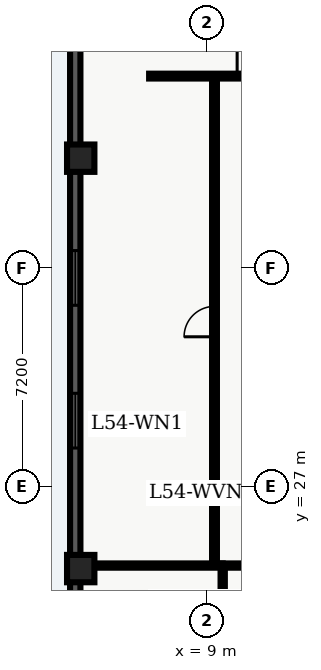
"""IFC4 building model, lengths in metres.
Left out: names, types, materials, properties, quantities, classifications, styles, units other than length and angle.
Written with IfcOpenShell. Run it as: python <this file> out.ifc"""

import sys

from ifc_helpers import new_model, entity, si_unit, converted_unit, direction, frame, origin_with_axes, origin_2d_with_axis, place, context, subcontext, project, spatial, polyline, rectangle, outline, extrude, element, fill, save


model = new_model("IFC4")
c1 = context("Model", 3, precision=1e-05, world=origin_with_axes(), true_north=direction((0.0, 1.0)))
c2 = subcontext(c1, "Body", "Model", "MODEL_VIEW")
j1 = project(units=[si_unit("LENGTHUNIT", "METRE"), converted_unit("PLANEANGLEUNIT", "DEGREE", entity("IfcPlaneAngleMeasure", 0.017), si_unit("PLANEANGLEUNIT", "RADIAN"), dimensions=[0, 0, 0, 0, 0, 0, 0])], contexts=[c1])
p1 = place(None, origin_with_axes())
s1 = spatial("IfcSite", under=j1, at=p1, CompositionType="ELEMENT")
p2 = place(p1, origin_with_axes())
s2 = spatial("IfcBuilding", under=s1, at=p2, CompositionType="ELEMENT")
p3 = place(p2, frame((0.0, 0.0, 219.9), z_axis=(0.0, 0.0, 1.0), x_axis=(1.0, 0.0, 0.0)))
s3 = spatial("IfcBuildingStorey", under=s2, at=p3, CompositionType="ELEMENT", Elevation=219.9)
for number, where, z_axis, x_axis in (
    (1, (4.85, 24.3, 0.0), (0.0, 0.0, 1.0), (1.0, 0.0, 0.0)),
    (2, (4.85, 37.8, 0.0), (0.0, 0.0, 1.0), (1.0, 0.0, 0.0)),
):
    element("IfcColumn", number, at=place(p3, frame(where, z_axis=z_axis, x_axis=x_axis)), inside=s3, PredefinedType="COLUMN", context=c2, shape_type="SweptSolid", body=[
        extrude(rectangle(XDim=0.9, YDim=0.9, at=origin_2d_with_axis()), origin_with_axes(), (0.0, 0.0, 1.0), 4.8),
    ])
p4 = place(p3, frame((9.52, 20.4, 0.0), z_axis=(0.0, 0.0, 1.0), x_axis=(0.0, 1.0, 0.0)))
e3 = element("IfcWall", 3, at=p4, inside=s3, PredefinedType="PARTITIONING", context=c2, shape_type="SweptSolid", body=[
    extrude(outline(polyline([(0.0, -0.07), (4.0, -0.07), (4.0, 0.07), (0.0, 0.07), (0.0, -0.07)])), origin_with_axes(), (0.0, 0.0, 1.0), 3.2),
])
p5 = place(p3, frame((9.52, 24.4, 0.0), z_axis=(0.0, 0.0, 1.0), x_axis=(1.0, 0.0, 0.0)))
e4 = element("IfcWall", 4, at=p5, inside=s3, PredefinedType="PARTITIONING", context=c2, shape_type="SweptSolid", body=[
    extrude(outline(polyline([(0.0, -0.07), (1.58, -0.07), (1.58, 0.07), (0.0, 0.07), (0.0, -0.07)])), origin_with_axes(), (0.0, 0.0, 1.0), 3.2),
])
p6 = place(p3, frame((7.1, 40.5, 0.0), z_axis=(0.0, 0.0, 1.0), x_axis=(1.0, 0.0, 0.0)))
e5 = element("IfcWall", 5, at=p6, inside=s3, PredefinedType="PARTITIONING", context=c2, shape_type="SweptSolid", body=[
    extrude(outline(polyline([(0.0, -0.08), (24.965, -0.08), (24.965, 0.08), (0.0, 0.08), (0.0, -0.08)])), origin_with_axes(), (0.0, 0.0, 1.0), 3.2),
])
p7 = place(p6, frame((3.395, 0.0, 0.0), z_axis=(0.0, 0.0, 1.0), x_axis=(1.0, 0.0, 0.0)))
e6 = element("IfcOpeningElement", 6, at=p7, cuts=e5, PredefinedType="OPENING", context=c2, shape_type="SweptSolid", body=[
    extrude(rectangle(XDim=1.0, YDim=0.18, at=origin_2d_with_axis()), origin_with_axes(), (0.0, 0.0, 1.0), 2.15),
])
p8 = place(p6, frame((8.66, 0.0, 0.0), z_axis=(0.0, 0.0, 1.0), x_axis=(1.0, 0.0, 0.0)))
e7 = element("IfcOpeningElement", 7, at=p8, cuts=e5, PredefinedType="OPENING", context=c2, shape_type="SweptSolid", body=[
    extrude(rectangle(XDim=1.0, YDim=0.18, at=origin_2d_with_axis()), origin_with_axes(), (0.0, 0.0, 1.0), 2.15),
])
p9 = place(p3, frame((9.25, 24.4, 0.0), z_axis=(0.0, 0.0, 1.0), x_axis=(0.0, 1.0, 0.0)))
e8 = element("IfcWall", 8, at=p9, inside=s3, PredefinedType="PARTITIONING", context=c2, shape_type="SweptSolid", body=[
    extrude(outline(polyline([(0.0, -0.08), (16.1, -0.08), (16.1, 0.08), (0.0, 0.08), (0.0, -0.08)])), origin_with_axes(), (0.0, 0.0, 1.0), 3.2),
])
p10 = place(p9, frame((8.025, 0.0, 0.0), z_axis=(0.0, 0.0, 1.0), x_axis=(1.0, 0.0, 0.0)))
e9 = element("IfcOpeningElement", 9, at=p10, cuts=e8, PredefinedType="OPENING", context=c2, shape_type="SweptSolid", body=[
    extrude(rectangle(XDim=1.0, YDim=0.18, at=origin_2d_with_axis()), origin_with_axes(), (0.0, 0.0, 1.0), 2.15),
])
p11 = place(p3, frame((4.835, 24.4, 0.0), z_axis=(0.0, 0.0, 1.0), x_axis=(1.0, 0.0, 0.0)))
e10 = element("IfcWall", 10, at=p11, inside=s3, PredefinedType="PARTITIONING", context=c2, shape_type="SweptSolid", body=[
    extrude(outline(polyline([(0.0, -0.07), (4.685, -0.07), (4.685, 0.07), (0.0, 0.07), (0.0, -0.07)])), origin_with_axes(), (0.0, 0.0, 1.0), 3.2),
])
p12 = place(p3, frame((4.67, 2.74, 0.0), z_axis=(0.0, 0.0, 1.0), x_axis=(0.0, 1.0, 0.0)))
e11 = element("IfcWall", 11, at=p12, inside=s3, PredefinedType="SOLIDWALL", context=c2, shape_type="SweptSolid", body=[
    extrude(outline(polyline([(0.0, -0.17), (43.46, -0.17), (43.46, 0.17), (0.0, 0.17), (0.0, -0.17)])), origin_with_axes(), (0.0, 0.0, 1.0), 4.56),
])
p13 = place(p12, frame((2.948, 0.0, 0.45), z_axis=(0.0, 0.0, 1.0), x_axis=(1.0, 0.0, 0.0)))
e12 = element("IfcOpeningElement", 12, at=p13, cuts=e11, PredefinedType="OPENING", context=c2, shape_type="SweptSolid", body=[
    extrude(rectangle(XDim=1.8, YDim=0.36, at=origin_2d_with_axis()), origin_with_axes(), (0.0, 0.0, 1.0), 2.1),
])
p14 = place(p12, frame((12.339, 0.0, 0.45), z_axis=(0.0, 0.0, 1.0), x_axis=(1.0, 0.0, 0.0)))
e13 = element("IfcOpeningElement", 13, at=p14, cuts=e11, PredefinedType="OPENING", context=c2, shape_type="SweptSolid", body=[
    extrude(rectangle(XDim=1.8, YDim=0.36, at=origin_2d_with_axis()), origin_with_axes(), (0.0, 0.0, 1.0), 2.1),
])
p15 = place(p12, frame((16.184, 0.0, 0.45), z_axis=(0.0, 0.0, 1.0), x_axis=(1.0, 0.0, 0.0)))
e14 = element("IfcOpeningElement", 14, at=p15, cuts=e11, PredefinedType="OPENING", context=c2, shape_type="SweptSolid", body=[
    extrude(rectangle(XDim=1.8, YDim=0.36, at=origin_2d_with_axis()), origin_with_axes(), (0.0, 0.0, 1.0), 2.1),
])
p16 = place(p12, frame((26.426, 0.0, 0.45), z_axis=(0.0, 0.0, 1.0), x_axis=(1.0, 0.0, 0.0)))
e15 = element("IfcOpeningElement", 15, at=p16, cuts=e11, PredefinedType="OPENING", context=c2, shape_type="SweptSolid", body=[
    extrude(rectangle(XDim=1.8, YDim=0.36, at=origin_2d_with_axis()), origin_with_axes(), (0.0, 0.0, 1.0), 2.1),
])
p17 = place(p12, frame((31.121, 0.0, 0.45), z_axis=(0.0, 0.0, 1.0), x_axis=(1.0, 0.0, 0.0)))
e16 = element("IfcOpeningElement", 16, at=p17, cuts=e11, PredefinedType="OPENING", context=c2, shape_type="SweptSolid", body=[
    extrude(rectangle(XDim=1.8, YDim=0.36, at=origin_2d_with_axis()), origin_with_axes(), (0.0, 0.0, 1.0), 2.1),
])
p18 = place(p12, frame((40.062, 0.0, 0.45), z_axis=(0.0, 0.0, 1.0), x_axis=(1.0, 0.0, 0.0)))
e17 = element("IfcOpeningElement", 17, at=p18, cuts=e11, PredefinedType="OPENING", context=c2, shape_type="SweptSolid", body=[
    extrude(rectangle(XDim=1.8, YDim=0.36, at=origin_2d_with_axis()), origin_with_axes(), (0.0, 0.0, 1.0), 2.1),
])
p19 = place(p9, frame((8.025, 0.0, 0.0), z_axis=(0.0, 0.0, 1.0), x_axis=(1.0, 0.0, 0.0)))
e18 = element("IfcDoor", 18, at=p19, inside=s3, OperationType="SINGLE_SWING_LEFT", PredefinedType="DOOR", context=c2, shape_type="SweptSolid", body=[
    extrude(rectangle(XDim=1.0, YDim=0.09, at=origin_2d_with_axis()), origin_with_axes(), (0.0, 0.0, 1.0), 2.15),
])
fill(e9, e18)
p20 = place(p6, frame((3.395, 0.0, 0.0), z_axis=(0.0, 0.0, 1.0), x_axis=(1.0, 0.0, 0.0)))
e19 = element("IfcDoor", 19, at=p20, inside=s3, OperationType="SINGLE_SWING_LEFT", PredefinedType="DOOR", context=c2, shape_type="SweptSolid", body=[
    extrude(rectangle(XDim=1.0, YDim=0.09, at=origin_2d_with_axis()), origin_with_axes(), (0.0, 0.0, 1.0), 2.15),
])
fill(e6, e19)
p21 = place(p12, frame((26.426, 0.0, 0.45), z_axis=(0.0, 0.0, 1.0), x_axis=(1.0, 0.0, 0.0)))
e20 = element("IfcWindow", 20, at=p21, inside=s3, PredefinedType="WINDOW", context=c2, shape_type="SweptSolid", body=[
    extrude(rectangle(XDim=1.8, YDim=0.09, at=origin_2d_with_axis()), origin_with_axes(), (0.0, 0.0, 1.0), 2.1),
])
fill(e15, e20)
p22 = place(p12, frame((31.121, 0.0, 0.45), z_axis=(0.0, 0.0, 1.0), x_axis=(1.0, 0.0, 0.0)))
e21 = element("IfcWindow", 21, at=p22, inside=s3, PredefinedType="WINDOW", context=c2, shape_type="SweptSolid", body=[
    extrude(rectangle(XDim=1.8, YDim=0.09, at=origin_2d_with_axis()), origin_with_axes(), (0.0, 0.0, 1.0), 2.1),
])
fill(e16, e21)
save(model, sys.argv[1])
